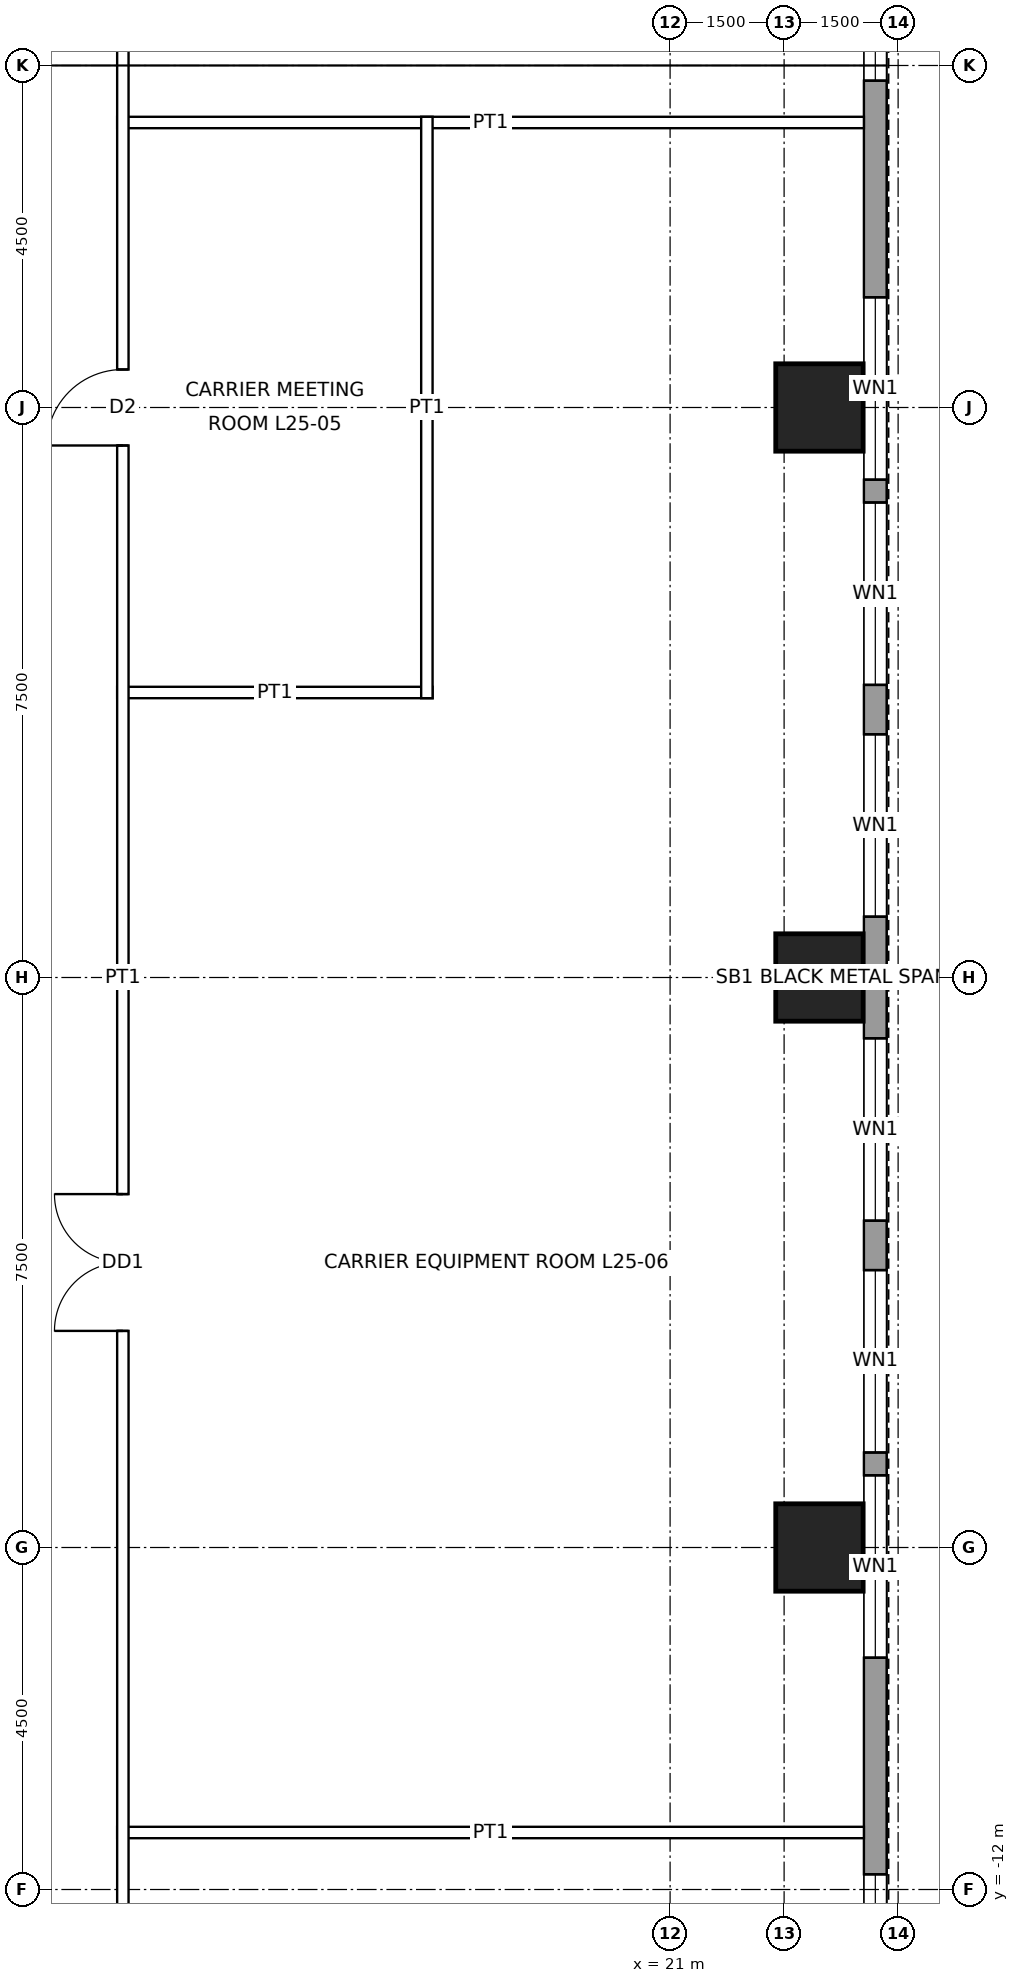
"""IFC4 building model, lengths in metres.
Left out: names, types, materials, properties, quantities, classifications, styles, units other than length and angle.
Written with IfcOpenShell. Run it as: python <this file> out.ifc"""

import sys

from ifc_helpers import new_model, si_unit, direction, frame, frame_2d, origin, origin_2d, place, context, subcontext, project, spatial, rectangle, hollow_rectangle, extrude, element, fill, save


model = new_model("IFC4")
c1 = context("Model", 3, precision=1e-05, world=origin(), true_north=direction((0.0, 1.0)))
c2 = subcontext(c1, "Body", "Model", "MODEL_VIEW")
j1 = project(units=[si_unit("LENGTHUNIT", "METRE"), si_unit("PLANEANGLEUNIT", "RADIAN")], contexts=[c1])
p1 = place(None, origin())
s1 = spatial("IfcSite", under=j1, at=p1, CompositionType="ELEMENT")
p2 = place(p1, origin())
s2 = spatial("IfcBuilding", under=s1, at=p2, CompositionType="ELEMENT")
p3 = place(p2, frame((0.0, 0.0, 126.9)))
s3 = spatial("IfcBuildingStorey", under=s2, at=p3, CompositionType="ELEMENT", Elevation=126.9)
for number, where, z_axis, x_axis in (
    (1, (22.965, 7.5, 0.0), (0.0, 0.0, 1.0), (1.0, 0.0, 0.0)),
    (2, (22.965, 0.0, 0.0), (0.0, 0.0, 1.0), (1.0, 0.0, 0.0)),
    (3, (22.965, -7.5, 0.0), (0.0, 0.0, 1.0), (1.0, 0.0, 0.0)),
):
    element("IfcColumn", number, at=place(p3, frame(where, z_axis=z_axis, x_axis=x_axis)), inside=s3, PredefinedType="COLUMN", context=c2, shape_type="SweptSolid", body=[
        extrude(hollow_rectangle(XDim=1.15, YDim=1.15, WallThickness=0.075, at=origin_2d()), origin(), (0.0, 0.0, 1.0), 4.5),
    ])
p4 = place(p3, frame((23.7, 16.2, 0.0), z_axis=(0.0, 0.0, 1.0), x_axis=(0.0, -1.0, 0.0)))
e4 = element("IfcWall", 4, at=p4, inside=s3, PredefinedType="SOLIDWALL", context=c2, shape_type="SweptSolid", body=[
    extrude(rectangle(XDim=32.4, YDim=0.3, at=frame_2d((16.2, 0.0))), origin(), (0.0, 0.0, 1.0), 4.3),
])
p5 = place(p4, frame((2.0, 0.0, 1.0)))
e5 = element("IfcOpeningElement", 5, at=p5, cuts=e4, PredefinedType="OPENING", context=c2, shape_type="SweptSolid", body=[
    extrude(rectangle(XDim=2.4, YDim=1.2, at=frame_2d((1.2, 0.6))), frame((0.0, 0.16, 0.0), z_axis=(0.0, -1.0, 0.0), x_axis=(1.0, 0.0, 0.0)), (0.0, 0.0, 1.0), 0.32),
])
p6 = place(p4, frame((7.25, 0.0, 1.0)))
e6 = element("IfcOpeningElement", 6, at=p6, cuts=e4, PredefinedType="OPENING", context=c2, shape_type="SweptSolid", body=[
    extrude(rectangle(XDim=2.4, YDim=1.2, at=frame_2d((1.2, 0.6))), frame((0.0, 0.16, 0.0), z_axis=(0.0, -1.0, 0.0), x_axis=(1.0, 0.0, 0.0)), (0.0, 0.0, 1.0), 0.32),
])
p7 = place(p4, frame((9.95, 0.0, 1.0)))
e7 = element("IfcOpeningElement", 7, at=p7, cuts=e4, PredefinedType="OPENING", context=c2, shape_type="SweptSolid", body=[
    extrude(rectangle(XDim=2.4, YDim=1.2, at=frame_2d((1.2, 0.6))), frame((0.0, 0.16, 0.0), z_axis=(0.0, -1.0, 0.0), x_axis=(1.0, 0.0, 0.0)), (0.0, 0.0, 1.0), 0.32),
])
p8 = place(p4, frame((13.0, 0.0, 1.0)))
e8 = element("IfcOpeningElement", 8, at=p8, cuts=e4, PredefinedType="OPENING", context=c2, shape_type="SweptSolid", body=[
    extrude(rectangle(XDim=2.4, YDim=1.2, at=frame_2d((1.2, 0.6))), frame((0.0, 0.16, 0.0), z_axis=(0.0, -1.0, 0.0), x_axis=(1.0, 0.0, 0.0)), (0.0, 0.0, 1.0), 0.32),
])
p9 = place(p4, frame((17.0, 0.0, 1.0)))
e9 = element("IfcOpeningElement", 9, at=p9, cuts=e4, PredefinedType="OPENING", context=c2, shape_type="SweptSolid", body=[
    extrude(rectangle(XDim=2.4, YDim=1.2, at=frame_2d((1.2, 0.6))), frame((0.0, 0.16, 0.0), z_axis=(0.0, -1.0, 0.0), x_axis=(1.0, 0.0, 0.0)), (0.0, 0.0, 1.0), 0.32),
])
p10 = place(p4, frame((20.05, 0.0, 1.0)))
e10 = element("IfcOpeningElement", 10, at=p10, cuts=e4, PredefinedType="OPENING", context=c2, shape_type="SweptSolid", body=[
    extrude(rectangle(XDim=2.4, YDim=1.2, at=frame_2d((1.2, 0.6))), frame((0.0, 0.16, 0.0), z_axis=(0.0, -1.0, 0.0), x_axis=(1.0, 0.0, 0.0)), (0.0, 0.0, 1.0), 0.32),
])
p11 = place(p4, frame((22.75, 0.0, 1.0)))
e11 = element("IfcOpeningElement", 11, at=p11, cuts=e4, PredefinedType="OPENING", context=c2, shape_type="SweptSolid", body=[
    extrude(rectangle(XDim=2.4, YDim=1.2, at=frame_2d((1.2, 0.6))), frame((0.0, 0.16, 0.0), z_axis=(0.0, -1.0, 0.0), x_axis=(1.0, 0.0, 0.0)), (0.0, 0.0, 1.0), 0.32),
])
p12 = place(p4, frame((28.0, 0.0, 1.0)))
e12 = element("IfcOpeningElement", 12, at=p12, cuts=e4, PredefinedType="OPENING", context=c2, shape_type="SweptSolid", body=[
    extrude(rectangle(XDim=2.4, YDim=1.2, at=frame_2d((1.2, 0.6))), frame((0.0, 0.16, 0.0), z_axis=(0.0, -1.0, 0.0), x_axis=(1.0, 0.0, 0.0)), (0.0, 0.0, 1.0), 0.32),
])
p13 = place(p3, frame((13.725, -11.25, 0.0), z_axis=(0.0, 0.0, 1.0), x_axis=(1.0, 0.0, 0.0)))
e13 = element("IfcWall", 13, at=p13, inside=s3, PredefinedType="PARTITIONING", context=c2, shape_type="SweptSolid", body=[
    extrude(rectangle(XDim=9.825, YDim=0.15, at=frame_2d((4.913, 0.0))), origin(), (0.0, 0.0, 1.0), 3.431),
])
p14 = place(p3, frame((13.725, 3.75, 0.0), z_axis=(0.0, 0.0, 1.0), x_axis=(1.0, 0.0, 0.0)))
e14 = element("IfcWall", 14, at=p14, inside=s3, PredefinedType="PARTITIONING", context=c2, shape_type="SweptSolid", body=[
    extrude(rectangle(XDim=4.15, YDim=0.15, at=frame_2d((2.075, 0.0))), origin(), (0.0, 0.0, 1.0), 3.431),
])
p15 = place(p3, frame((13.725, 11.25, 0.0), z_axis=(0.0, 0.0, 1.0), x_axis=(1.0, 0.0, 0.0)))
e15 = element("IfcWall", 15, at=p15, inside=s3, PredefinedType="PARTITIONING", context=c2, shape_type="SweptSolid", body=[
    extrude(rectangle(XDim=9.825, YDim=0.15, at=frame_2d((4.913, 0.0))), origin(), (0.0, 0.0, 1.0), 3.431),
])
p16 = place(p3, frame((13.8, -13.875, 0.0), z_axis=(0.0, 0.0, 1.0), x_axis=(0.0, 1.0, 0.0)))
e16 = element("IfcWall", 16, at=p16, inside=s3, PredefinedType="PARTITIONING", context=c2, shape_type="SweptSolid", body=[
    extrude(rectangle(XDim=27.75, YDim=0.15, at=frame_2d((13.875, 0.0))), origin(), (0.0, 0.0, 1.0), 4.3),
])
p17 = place(p16, frame((20.875, 0.0, 0.0)))
e17 = element("IfcOpeningElement", 17, at=p17, cuts=e16, PredefinedType="OPENING", context=c2, shape_type="SweptSolid", body=[
    extrude(rectangle(XDim=1.0, YDim=2.1, at=frame_2d((0.5, 1.05))), frame((0.0, 0.085, 0.0), z_axis=(0.0, -1.0, 0.0), x_axis=(1.0, 0.0, 0.0)), (0.0, 0.0, 1.0), 0.17),
])
p18 = place(p16, frame((9.225, 0.0, 0.0)))
e18 = element("IfcOpeningElement", 18, at=p18, cuts=e16, PredefinedType="OPENING", context=c2, shape_type="SweptSolid", body=[
    extrude(rectangle(XDim=1.8, YDim=2.4, at=frame_2d((0.9, 1.2))), frame((0.0, 0.085, 0.0), z_axis=(0.0, -1.0, 0.0), x_axis=(1.0, 0.0, 0.0)), (0.0, 0.0, 1.0), 0.17),
])
p19 = place(p3, frame((17.8, 3.675, 0.0), z_axis=(0.0, 0.0, 1.0), x_axis=(0.0, 1.0, 0.0)))
e19 = element("IfcWall", 19, at=p19, inside=s3, PredefinedType="PARTITIONING", context=c2, shape_type="SweptSolid", body=[
    extrude(rectangle(XDim=7.65, YDim=0.15, at=frame_2d((3.825, 0.0))), origin(), (0.0, 0.0, 1.0), 4.3),
])
p20 = place(p5, origin())
e20 = element("IfcWindow", 20, at=p20, inside=s3, PartitioningType="SINGLE_PANEL", PredefinedType="WINDOW", context=c2, shape_type="SweptSolid", body=[
    extrude(rectangle(XDim=2.4, YDim=1.2, at=frame_2d((1.2, 0.6))), frame((0.0, 0.03, 0.0), z_axis=(0.0, -1.0, 0.0), x_axis=(1.0, 0.0, 0.0)), (0.0, 0.0, 1.0), 0.06),
])
fill(e5, e20)
p21 = place(p6, origin())
e21 = element("IfcWindow", 21, at=p21, inside=s3, PartitioningType="SINGLE_PANEL", PredefinedType="WINDOW", context=c2, shape_type="SweptSolid", body=[
    extrude(rectangle(XDim=2.4, YDim=1.2, at=frame_2d((1.2, 0.6))), frame((0.0, 0.03, 0.0), z_axis=(0.0, -1.0, 0.0), x_axis=(1.0, 0.0, 0.0)), (0.0, 0.0, 1.0), 0.06),
])
fill(e6, e21)
p22 = place(p7, origin())
e22 = element("IfcWindow", 22, at=p22, inside=s3, PartitioningType="SINGLE_PANEL", PredefinedType="WINDOW", context=c2, shape_type="SweptSolid", body=[
    extrude(rectangle(XDim=2.4, YDim=1.2, at=frame_2d((1.2, 0.6))), frame((0.0, 0.03, 0.0), z_axis=(0.0, -1.0, 0.0), x_axis=(1.0, 0.0, 0.0)), (0.0, 0.0, 1.0), 0.06),
])
fill(e7, e22)
p23 = place(p8, origin())
e23 = element("IfcWindow", 23, at=p23, inside=s3, PartitioningType="SINGLE_PANEL", PredefinedType="WINDOW", context=c2, shape_type="SweptSolid", body=[
    extrude(rectangle(XDim=2.4, YDim=1.2, at=frame_2d((1.2, 0.6))), frame((0.0, 0.03, 0.0), z_axis=(0.0, -1.0, 0.0), x_axis=(1.0, 0.0, 0.0)), (0.0, 0.0, 1.0), 0.06),
])
fill(e8, e23)
p24 = place(p9, origin())
e24 = element("IfcWindow", 24, at=p24, inside=s3, PartitioningType="SINGLE_PANEL", PredefinedType="WINDOW", context=c2, shape_type="SweptSolid", body=[
    extrude(rectangle(XDim=2.4, YDim=1.2, at=frame_2d((1.2, 0.6))), frame((0.0, 0.03, 0.0), z_axis=(0.0, -1.0, 0.0), x_axis=(1.0, 0.0, 0.0)), (0.0, 0.0, 1.0), 0.06),
])
fill(e9, e24)
p25 = place(p10, origin())
e25 = element("IfcWindow", 25, at=p25, inside=s3, PartitioningType="SINGLE_PANEL", PredefinedType="WINDOW", context=c2, shape_type="SweptSolid", body=[
    extrude(rectangle(XDim=2.4, YDim=1.2, at=frame_2d((1.2, 0.6))), frame((0.0, 0.03, 0.0), z_axis=(0.0, -1.0, 0.0), x_axis=(1.0, 0.0, 0.0)), (0.0, 0.0, 1.0), 0.06),
])
fill(e10, e25)
p26 = place(p11, origin())
e26 = element("IfcWindow", 26, at=p26, inside=s3, PartitioningType="SINGLE_PANEL", PredefinedType="WINDOW", context=c2, shape_type="SweptSolid", body=[
    extrude(rectangle(XDim=2.4, YDim=1.2, at=frame_2d((1.2, 0.6))), frame((0.0, 0.03, 0.0), z_axis=(0.0, -1.0, 0.0), x_axis=(1.0, 0.0, 0.0)), (0.0, 0.0, 1.0), 0.06),
])
fill(e11, e26)
p27 = place(p12, origin())
e27 = element("IfcWindow", 27, at=p27, inside=s3, PartitioningType="SINGLE_PANEL", PredefinedType="WINDOW", context=c2, shape_type="SweptSolid", body=[
    extrude(rectangle(XDim=2.4, YDim=1.2, at=frame_2d((1.2, 0.6))), frame((0.0, 0.03, 0.0), z_axis=(0.0, -1.0, 0.0), x_axis=(1.0, 0.0, 0.0)), (0.0, 0.0, 1.0), 0.06),
])
fill(e12, e27)
p28 = place(p17, origin())
e28 = element("IfcDoor", 28, at=p28, inside=s3, OperationType="SINGLE_SWING_LEFT", PredefinedType="DOOR", context=c2, shape_type="SweptSolid", body=[
    extrude(rectangle(XDim=1.0, YDim=2.1, at=frame_2d((0.5, 1.05))), frame((0.0, 0.025, 0.0), z_axis=(0.0, -1.0, 0.0), x_axis=(1.0, 0.0, 0.0)), (0.0, 0.0, 1.0), 0.05),
])
fill(e17, e28)
p29 = place(p18, origin())
e29 = element("IfcDoor", 29, at=p29, inside=s3, OperationType="DOUBLE_DOOR_SINGLE_SWING", PredefinedType="DOOR", context=c2, shape_type="SweptSolid", body=[
    extrude(rectangle(XDim=1.8, YDim=2.4, at=frame_2d((0.9, 1.2))), frame((0.0, 0.025, 0.0), z_axis=(0.0, -1.0, 0.0), x_axis=(1.0, 0.0, 0.0)), (0.0, 0.0, 1.0), 0.05),
])
fill(e18, e29)
save(model, sys.argv[1])
